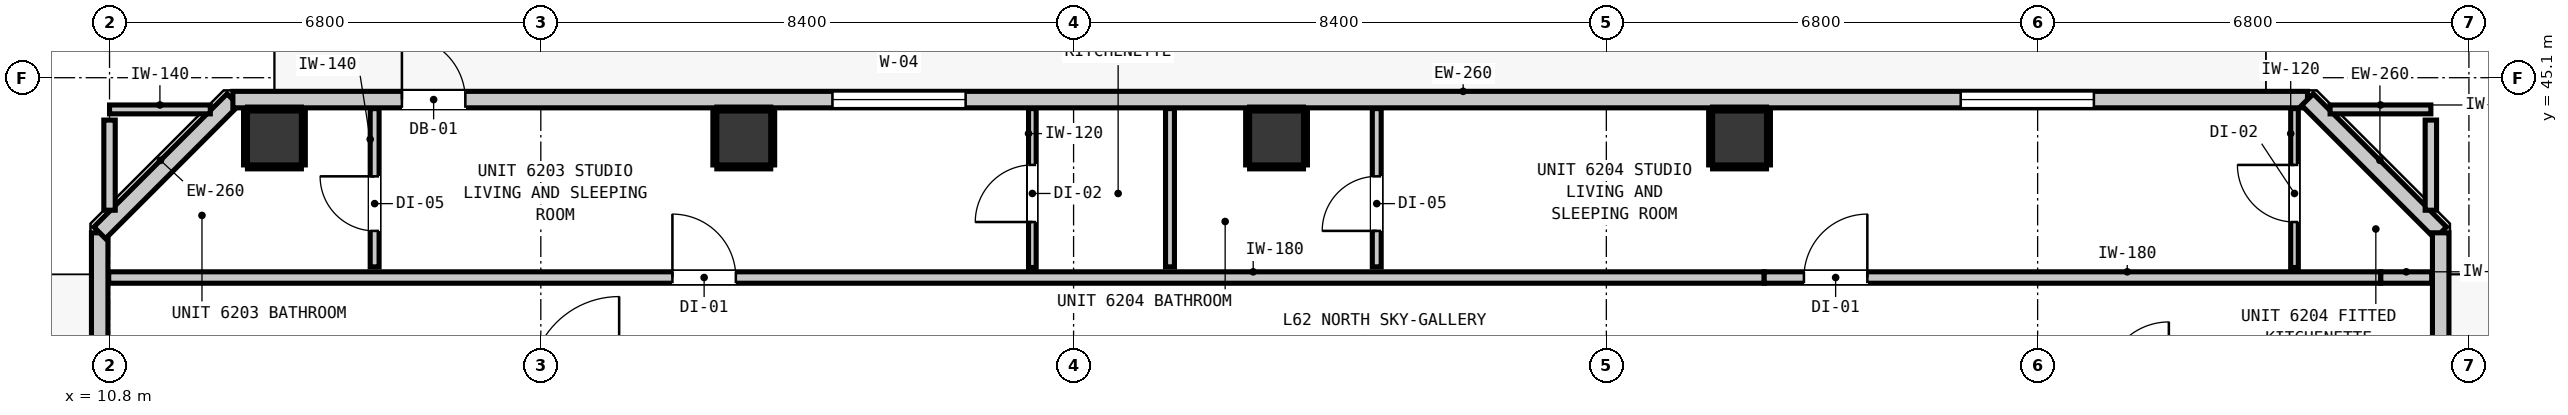
"""IFC4 building model, lengths in metres.
Left out: names, types, materials, properties, quantities, classifications, styles, units other than length and angle.
Written with IfcOpenShell. Run it as: python <this file> out.ifc"""

import sys

from ifc_helpers import new_model, si_unit, direction, frame, frame_2d, origin, origin_2d, place, context, subcontext, project, spatial, rectangle, extrude, element, fill, save


model = new_model("IFC4")
c1 = context("Model", 3, precision=1e-05, world=origin(), true_north=direction((0.0, 1.0)))
c2 = subcontext(c1, "Body", "Model", "MODEL_VIEW")
j1 = project(units=[si_unit("LENGTHUNIT", "METRE"), si_unit("PLANEANGLEUNIT", "RADIAN")], contexts=[c1])
p1 = place(None, origin())
s1 = spatial("IfcSite", under=j1, at=p1, CompositionType="ELEMENT")
p2 = place(p1, origin())
s2 = spatial("IfcBuilding", under=s1, at=p2, CompositionType="ELEMENT")
p3 = place(p2, frame((0.0, 0.0, 213.4)))
s3 = spatial("IfcBuildingStorey", under=s2, at=p3, CompositionType="ELEMENT", Elevation=213.4)
for number, where, z_axis, x_axis in (
    (1, (13.4, 44.15, 0.0), (0.0, 0.0, 1.0), (1.0, 0.0, 0.0)),
    (2, (20.8, 44.15, 0.0), (0.0, 0.0, 1.0), (1.0, 0.0, 0.0)),
    (3, (29.2, 44.15, 0.0), (0.0, 0.0, 1.0), (1.0, 0.0, 0.0)),
    (4, (36.5, 44.15, 0.0), (0.0, 0.0, 1.0), (1.0, 0.0, 0.0)),
):
    element("IfcColumn", number, at=place(p3, frame(where, z_axis=z_axis, x_axis=x_axis)), inside=s3, PredefinedType="COLUMN", context=c2, shape_type="SweptSolid", body=[
        extrude(rectangle(XDim=0.85, YDim=0.85, at=origin_2d()), origin(), (0.0, 0.0, 1.0), 3.32),
    ])
p4 = place(p3, frame((10.645, 12.345, 0.0), z_axis=(0.0, 0.0, 1.0), x_axis=(0.0, 1.0, 0.0)))
e5 = element("IfcWall", 5, at=p4, inside=s3, PredefinedType="STANDARD", context=c2, shape_type="SweptSolid", body=[
    extrude(rectangle(XDim=30.31, YDim=0.26, at=frame_2d((15.155, 0.0))), origin(), (0.0, 0.0, 1.0), 3.1),
])
p5 = place(p4, frame((0.91, 0.0, 0.0)))
e6 = element("IfcOpeningElement", 6, at=p5, cuts=e5, PredefinedType="OPENING", context=c2, shape_type="SweptSolid", body=[
    extrude(rectangle(XDim=1.0, YDim=2.15, at=frame_2d((0.5, 1.075))), frame((0.0, 0.14, 0.0), z_axis=(0.0, -1.0, 0.0), x_axis=(1.0, 0.0, 0.0)), (0.0, 0.0, 1.0), 0.28),
])
p6 = place(p4, frame((2.322, 0.0, 0.85)))
e7 = element("IfcOpeningElement", 7, at=p6, cuts=e5, PredefinedType="OPENING", context=c2, shape_type="SweptSolid", body=[
    extrude(rectangle(XDim=0.58, YDim=1.5, at=frame_2d((0.29, 0.75))), frame((0.0, 0.14, 0.0), z_axis=(0.0, -1.0, 0.0), x_axis=(1.0, 0.0, 0.0)), (0.0, 0.0, 1.0), 0.28),
])
p7 = place(p3, frame((10.645, 42.655, 0.0), z_axis=(0.0, 0.0, 1.0), x_axis=(0.707147883682, 0.707065676302, 0.0)))
e8 = element("IfcWall", 8, at=p7, inside=s3, PredefinedType="STANDARD", context=c2, shape_type="SweptSolid", body=[
    extrude(rectangle(XDim=2.97, YDim=0.26, at=frame_2d((1.485, 0.0))), origin(), (0.0, 0.0, 1.0), 3.1),
])
p8 = place(p3, frame((12.745, 44.755, 0.0), z_axis=(0.0, 0.0, 1.0), x_axis=(1.0, 0.0, 0.0)))
e9 = element("IfcWall", 9, at=p8, inside=s3, PredefinedType="STANDARD", context=c2, shape_type="SweptSolid", body=[
    extrude(rectangle(XDim=32.71, YDim=0.26, at=frame_2d((16.355, 0.0))), origin(), (0.0, 0.0, 1.0), 3.1),
])
p9 = place(p8, frame((2.665, 0.0, 0.0)))
e10 = element("IfcOpeningElement", 10, at=p9, cuts=e9, PredefinedType="OPENING", context=c2, shape_type="SweptSolid", body=[
    extrude(rectangle(XDim=1.0, YDim=2.15, at=frame_2d((0.5, 1.075))), frame((0.0, 0.14, 0.0), z_axis=(0.0, -1.0, 0.0), x_axis=(1.0, 0.0, 0.0)), (0.0, 0.0, 1.0), 0.28),
])
p10 = place(p8, frame((9.453, 0.0, 0.85)))
e11 = element("IfcOpeningElement", 11, at=p10, cuts=e9, PredefinedType="OPENING", context=c2, shape_type="SweptSolid", body=[
    extrude(rectangle(XDim=2.1, YDim=1.9, at=frame_2d((1.05, 0.95))), frame((0.0, 0.14, 0.0), z_axis=(0.0, -1.0, 0.0), x_axis=(1.0, 0.0, 0.0)), (0.0, 0.0, 1.0), 0.28),
])
p11 = place(p8, frame((27.242, 0.0, 0.85)))
e12 = element("IfcOpeningElement", 12, at=p11, cuts=e9, PredefinedType="OPENING", context=c2, shape_type="SweptSolid", body=[
    extrude(rectangle(XDim=2.1, YDim=1.9, at=frame_2d((1.05, 0.95))), frame((0.0, 0.14, 0.0), z_axis=(0.0, -1.0, 0.0), x_axis=(1.0, 0.0, 0.0)), (0.0, 0.0, 1.0), 0.28),
])
p12 = place(p3, frame((45.455, 44.755, 0.0), z_axis=(0.0, 0.0, 1.0), x_axis=(0.707106781187, -0.707106781187, 0.0)))
e13 = element("IfcWall", 13, at=p12, inside=s3, PredefinedType="STANDARD", context=c2, shape_type="SweptSolid", body=[
    extrude(rectangle(XDim=2.97, YDim=0.26, at=frame_2d((1.485, 0.0))), origin(), (0.0, 0.0, 1.0), 3.1),
])
p13 = place(p3, frame((47.555, 42.655, 0.0), z_axis=(0.0, 0.0, 1.0), x_axis=(0.0, -1.0, 0.0)))
e14 = element("IfcWall", 14, at=p13, inside=s3, PredefinedType="STANDARD", context=c2, shape_type="SweptSolid", body=[
    extrude(rectangle(XDim=30.31, YDim=0.26, at=frame_2d((15.155, 0.0))), origin(), (0.0, 0.0, 1.0), 3.1),
])
p14 = place(p13, frame((4.082, 0.0, 0.0)))
e15 = element("IfcOpeningElement", 15, at=p14, cuts=e14, PredefinedType="OPENING", context=c2, shape_type="SweptSolid", body=[
    extrude(rectangle(XDim=1.0, YDim=2.15, at=frame_2d((0.5, 1.075))), frame((0.0, 0.14, 0.0), z_axis=(0.0, -1.0, 0.0), x_axis=(1.0, 0.0, 0.0)), (0.0, 0.0, 1.0), 0.28),
])
p15 = place(p13, frame((24.101, 0.0, 0.85)))
e16 = element("IfcOpeningElement", 16, at=p15, cuts=e14, PredefinedType="OPENING", context=c2, shape_type="SweptSolid", body=[
    extrude(rectangle(XDim=2.1, YDim=1.9, at=frame_2d((1.05, 0.95))), frame((0.0, 0.14, 0.0), z_axis=(0.0, -1.0, 0.0), x_axis=(1.0, 0.0, 0.0)), (0.0, 0.0, 1.0), 0.28),
])
p16 = place(p13, frame((27.658, 0.0, 0.85)))
e17 = element("IfcOpeningElement", 17, at=p16, cuts=e14, PredefinedType="OPENING", context=c2, shape_type="SweptSolid", body=[
    extrude(rectangle(XDim=2.1, YDim=1.9, at=frame_2d((1.05, 0.95))), frame((0.0, 0.14, 0.0), z_axis=(0.0, -1.0, 0.0), x_axis=(1.0, 0.0, 0.0)), (0.0, 0.0, 1.0), 0.28),
])
p17 = place(p13, frame((15.255, 0.0, 0.85)))
e18 = element("IfcOpeningElement", 18, at=p17, cuts=e14, PredefinedType="OPENING", context=c2, shape_type="SweptSolid", body=[
    extrude(rectangle(XDim=2.1, YDim=1.9, at=frame_2d((1.05, 0.95))), frame((0.0, 0.14, 0.0), z_axis=(0.0, -1.0, 0.0), x_axis=(1.0, 0.0, 0.0)), (0.0, 0.0, 1.0), 0.28),
])
p18 = place(p3, frame((10.787, 41.95, 0.0), z_axis=(0.0, 0.0, 1.0), x_axis=(1.0, 0.0, 0.0)))
e19 = element("IfcWall", 19, at=p18, inside=s3, PredefinedType="PARTITIONING", context=c2, shape_type="SweptSolid", body=[
    extrude(rectangle(XDim=26.102, YDim=0.18, at=frame_2d((13.051, 0.0))), origin(), (0.0, 0.0, 1.0), 3.1),
])
p19 = place(p18, frame((8.888, 0.0, 0.0)))
e20 = element("IfcOpeningElement", 20, at=p19, cuts=e19, PredefinedType="OPENING", context=c2, shape_type="SweptSolid", body=[
    extrude(rectangle(XDim=1.0, YDim=2.15, at=frame_2d((0.5, 1.075))), frame((0.0, 0.1, 0.0), z_axis=(0.0, -1.0, 0.0), x_axis=(1.0, 0.0, 0.0)), (0.0, 0.0, 1.0), 0.2),
])
p20 = place(p3, frame((36.889, 41.95, 0.0), z_axis=(0.0, 0.0, 1.0), x_axis=(1.0, 0.0, 0.0)))
e21 = element("IfcWall", 21, at=p20, inside=s3, PredefinedType="PARTITIONING", context=c2, shape_type="SweptSolid", body=[
    extrude(rectangle(XDim=9.722, YDim=0.18, at=frame_2d((4.861, 0.0))), origin(), (0.0, 0.0, 1.0), 2.477),
])
p21 = place(p20, frame((0.626, 0.0, 0.0)))
e22 = element("IfcOpeningElement", 22, at=p21, cuts=e21, PredefinedType="OPENING", context=c2, shape_type="SweptSolid", body=[
    extrude(rectangle(XDim=1.0, YDim=2.15, at=frame_2d((0.5, 1.075))), frame((0.0, 0.1, 0.0), z_axis=(0.0, -1.0, 0.0), x_axis=(1.0, 0.0, 0.0)), (0.0, 0.0, 1.0), 0.2),
])
p22 = place(p3, frame((46.611, 41.95, 0.0), z_axis=(0.0, 0.0, 1.0), x_axis=(1.0, 0.0, 0.0)))
e23 = element("IfcWall", 23, at=p22, inside=s3, PredefinedType="PARTITIONING", context=c2, shape_type="SweptSolid", body=[
    extrude(rectangle(XDim=0.802, YDim=0.18, at=frame_2d((0.401, 0.0))), origin(), (0.0, 0.0, 1.0), 3.1),
])
for number, where, z_axis, x_axis in (
    (24, (10.8, 44.6, 0.0), (0.0, 0.0, 1.0), (1.0, 0.0, 0.0)),
    (25, (45.811, 44.6, 0.0), (0.0, 0.0, 1.0), (1.0, 0.0, 0.0)),
):
    element("IfcWall", number, at=place(p3, frame(where, z_axis=z_axis, x_axis=x_axis)), inside=s3, PredefinedType="PARTITIONING", context=c2, shape_type="SweptSolid", body=[
        extrude(rectangle(XDim=1.589, YDim=0.14, at=frame_2d((0.794, 0.0))), origin(), (0.0, 0.0, 1.0), 3.1),
    ])
for number, where, z_axis, x_axis in (
    (26, (10.8, 43.011, 0.0), (0.0, 0.0, 1.0), (0.0, 1.0, 0.0)),
    (27, (47.4, 43.011, 0.0), (0.0, 0.0, 1.0), (0.0, 1.0, 0.0)),
):
    element("IfcWall", number, at=place(p3, frame(where, z_axis=z_axis, x_axis=x_axis)), inside=s3, PredefinedType="PARTITIONING", context=c2, shape_type="SweptSolid", body=[
        extrude(rectangle(XDim=1.421, YDim=0.18, at=frame_2d((0.71, 0.0))), origin(), (0.0, 0.0, 1.0), 3.1),
    ])
p23 = place(p3, frame((14.98, 42.118, 0.0), z_axis=(0.0, 0.0, 1.0), x_axis=(0.0, 1.0, 0.0)))
e28 = element("IfcWall", 28, at=p23, inside=s3, PredefinedType="PARTITIONING", context=c2, shape_type="SweptSolid", body=[
    extrude(rectangle(XDim=2.495, YDim=0.14, at=frame_2d((1.248, 0.0))), origin(), (0.0, 0.0, 1.0), 3.1),
])
p24 = place(p23, frame((0.567, 0.0, 0.0)))
e29 = element("IfcOpeningElement", 29, at=p24, cuts=e28, PredefinedType="OPENING", context=c2, shape_type="SweptSolid", body=[
    extrude(rectangle(XDim=0.86, YDim=2.02, at=frame_2d((0.43, 1.01))), frame((0.0, 0.08, 0.0), z_axis=(0.0, -1.0, 0.0), x_axis=(1.0, 0.0, 0.0)), (0.0, 0.0, 1.0), 0.16),
])
p25 = place(p3, frame((27.52, 42.118, 0.0), z_axis=(0.0, 0.0, 1.0), x_axis=(0.0, 1.0, 0.0)))
e30 = element("IfcWall", 30, at=p25, inside=s3, PredefinedType="PARTITIONING", context=c2, shape_type="SweptSolid", body=[
    extrude(rectangle(XDim=2.495, YDim=0.14, at=frame_2d((1.248, 0.0))), origin(), (0.0, 0.0, 1.0), 3.1),
])
p26 = place(p3, frame((30.78, 42.118, 0.0), z_axis=(0.0, 0.0, 1.0), x_axis=(0.0, 1.0, 0.0)))
e31 = element("IfcWall", 31, at=p26, inside=s3, PredefinedType="PARTITIONING", context=c2, shape_type="SweptSolid", body=[
    extrude(rectangle(XDim=2.495, YDim=0.14, at=frame_2d((1.248, 0.0))), origin(), (0.0, 0.0, 1.0), 3.1),
])
p27 = place(p26, frame((0.567, 0.0, 0.0)))
e32 = element("IfcOpeningElement", 32, at=p27, cuts=e31, PredefinedType="OPENING", context=c2, shape_type="SweptSolid", body=[
    extrude(rectangle(XDim=0.86, YDim=2.02, at=frame_2d((0.43, 1.01))), frame((0.0, 0.08, 0.0), z_axis=(0.0, -1.0, 0.0), x_axis=(1.0, 0.0, 0.0)), (0.0, 0.0, 1.0), 0.16),
])
p28 = place(p3, frame((25.35, 42.108, 0.0), z_axis=(0.0, 0.0, 1.0), x_axis=(0.0, 1.0, 0.0)))
e33 = element("IfcWall", 33, at=p28, inside=s3, PredefinedType="PARTITIONING", context=c2, shape_type="SweptSolid", body=[
    extrude(rectangle(XDim=2.505, YDim=0.12, at=frame_2d((1.252, 0.0))), origin(), (0.0, 0.0, 1.0), 3.1),
])
p29 = place(p28, frame((0.717, 0.0, 0.0)))
e34 = element("IfcOpeningElement", 34, at=p29, cuts=e33, PredefinedType="OPENING", context=c2, shape_type="SweptSolid", body=[
    extrude(rectangle(XDim=0.9, YDim=2.1, at=frame_2d((0.45, 1.05))), frame((0.0, 0.07, 0.0), z_axis=(0.0, -1.0, 0.0), x_axis=(1.0, 0.0, 0.0)), (0.0, 0.0, 1.0), 0.14),
])
p30 = place(p3, frame((45.25, 42.108, 0.0), z_axis=(0.0, 0.0, 1.0), x_axis=(0.0, 1.0, 0.0)))
e35 = element("IfcWall", 35, at=p30, inside=s3, PredefinedType="PARTITIONING", context=c2, shape_type="SweptSolid", body=[
    extrude(rectangle(XDim=2.505, YDim=0.12, at=frame_2d((1.252, 0.0))), origin(), (0.0, 0.0, 1.0), 3.1),
])
p31 = place(p30, frame((0.717, 0.0, 0.0)))
e36 = element("IfcOpeningElement", 36, at=p31, cuts=e35, PredefinedType="OPENING", context=c2, shape_type="SweptSolid", body=[
    extrude(rectangle(XDim=0.9, YDim=2.1, at=frame_2d((0.45, 1.05))), frame((0.0, 0.07, 0.0), z_axis=(0.0, -1.0, 0.0), x_axis=(1.0, 0.0, 0.0)), (0.0, 0.0, 1.0), 0.14),
])
for number, where, z_axis, x_axis in (
    (37, (12.975, 43.693, 0.0), (0.0, 0.0, 1.0), (1.0, 0.0, 0.0)),
    (38, (12.975, 44.607, 0.0), (0.0, 0.0, 1.0), (1.0, 0.0, 0.0)),
    (39, (12.943, 43.725, 0.0), (0.0, 0.0, 1.0), (0.0, 1.0, 0.0)),
    (40, (13.857, 43.725, 0.0), (0.0, 0.0, 1.0), (0.0, 1.0, 0.0)),
):
    element("IfcWall", number, at=place(p3, frame(where, z_axis=z_axis, x_axis=x_axis)), inside=s3, PredefinedType="PARTITIONING", context=c2, shape_type="SweptSolid", body=[
        extrude(rectangle(XDim=0.85, YDim=0.06, at=frame_2d((0.425, 0.0))), origin(), (0.0, 0.0, 1.0), 1.45),
    ])
for number, where, z_axis, x_axis in (
    (41, (20.375, 43.693, 0.0), (0.0, 0.0, 1.0), (1.0, 0.0, 0.0)),
    (42, (20.375, 44.607, 0.0), (0.0, 0.0, 1.0), (1.0, 0.0, 0.0)),
):
    element("IfcWall", number, at=place(p3, frame(where, z_axis=z_axis, x_axis=x_axis)), inside=s3, PredefinedType="PARTITIONING", context=c2, shape_type="SweptSolid", body=[
        extrude(rectangle(XDim=0.85, YDim=0.06, at=frame_2d((0.425, 0.0))), origin(), (0.0, 0.0, 1.0), 1.45),
    ])
for number, where, z_axis, x_axis in (
    (43, (20.343, 43.725, 0.0), (0.0, 0.0, 1.0), (0.0, 1.0, 0.0)),
    (44, (21.257, 43.725, 0.0), (0.0, 0.0, 1.0), (0.0, 1.0, 0.0)),
):
    element("IfcWall", number, at=place(p3, frame(where, z_axis=z_axis, x_axis=x_axis)), inside=s3, PredefinedType="PARTITIONING", context=c2, shape_type="SweptSolid", body=[
        extrude(rectangle(XDim=0.85, YDim=0.06, at=frame_2d((0.425, 0.0))), origin(), (0.0, 0.0, 1.0), 1.45),
    ])
for number, where, z_axis, x_axis in (
    (45, (28.775, 43.693, 0.0), (0.0, 0.0, 1.0), (1.0, 0.0, 0.0)),
    (46, (28.775, 44.607, 0.0), (0.0, 0.0, 1.0), (1.0, 0.0, 0.0)),
):
    element("IfcWall", number, at=place(p3, frame(where, z_axis=z_axis, x_axis=x_axis)), inside=s3, PredefinedType="PARTITIONING", context=c2, shape_type="SweptSolid", body=[
        extrude(rectangle(XDim=0.85, YDim=0.06, at=frame_2d((0.425, 0.0))), origin(), (0.0, 0.0, 1.0), 1.45),
    ])
for number, where, z_axis, x_axis in (
    (47, (28.743, 43.725, 0.0), (0.0, 0.0, 1.0), (0.0, 1.0, 0.0)),
    (48, (29.657, 43.725, 0.0), (0.0, 0.0, 1.0), (0.0, 1.0, 0.0)),
):
    element("IfcWall", number, at=place(p3, frame(where, z_axis=z_axis, x_axis=x_axis)), inside=s3, PredefinedType="PARTITIONING", context=c2, shape_type="SweptSolid", body=[
        extrude(rectangle(XDim=0.85, YDim=0.06, at=frame_2d((0.425, 0.0))), origin(), (0.0, 0.0, 1.0), 1.45),
    ])
for number, where, z_axis, x_axis in (
    (49, (36.075, 43.693, 0.0), (0.0, 0.0, 1.0), (1.0, 0.0, 0.0)),
    (50, (36.075, 44.607, 0.0), (0.0, 0.0, 1.0), (1.0, 0.0, 0.0)),
):
    element("IfcWall", number, at=place(p3, frame(where, z_axis=z_axis, x_axis=x_axis)), inside=s3, PredefinedType="PARTITIONING", context=c2, shape_type="SweptSolid", body=[
        extrude(rectangle(XDim=0.85, YDim=0.06, at=frame_2d((0.425, 0.0))), origin(), (0.0, 0.0, 1.0), 1.45),
    ])
for number, where, z_axis, x_axis in (
    (51, (36.043, 43.725, 0.0), (0.0, 0.0, 1.0), (0.0, 1.0, 0.0)),
    (52, (36.957, 43.725, 0.0), (0.0, 0.0, 1.0), (0.0, 1.0, 0.0)),
):
    element("IfcWall", number, at=place(p3, frame(where, z_axis=z_axis, x_axis=x_axis)), inside=s3, PredefinedType="PARTITIONING", context=c2, shape_type="SweptSolid", body=[
        extrude(rectangle(XDim=0.85, YDim=0.06, at=frame_2d((0.425, 0.0))), origin(), (0.0, 0.0, 1.0), 1.45),
    ])
p32 = place(p9, origin())
e53 = element("IfcDoor", 53, at=p32, inside=s3, OperationType="SINGLE_SWING_LEFT", PredefinedType="DOOR", context=c2, shape_type="SweptSolid", body=[
    extrude(rectangle(XDim=1.0, YDim=2.15, at=frame_2d((0.5, 1.075))), frame((0.0, 0.025, 0.0), z_axis=(0.0, -1.0, 0.0), x_axis=(1.0, 0.0, 0.0)), (0.0, 0.0, 1.0), 0.05),
])
fill(e10, e53)
p33 = place(p10, origin())
e54 = element("IfcWindow", 54, at=p33, inside=s3, PartitioningType="SINGLE_PANEL", PredefinedType="WINDOW", context=c2, shape_type="SweptSolid", body=[
    extrude(rectangle(XDim=2.1, YDim=1.9, at=frame_2d((1.05, 0.95))), frame((0.0, 0.03, 0.0), z_axis=(0.0, -1.0, 0.0), x_axis=(1.0, 0.0, 0.0)), (0.0, 0.0, 1.0), 0.06),
])
fill(e11, e54)
p34 = place(p11, origin())
e55 = element("IfcWindow", 55, at=p34, inside=s3, PartitioningType="SINGLE_PANEL", PredefinedType="WINDOW", context=c2, shape_type="SweptSolid", body=[
    extrude(rectangle(XDim=2.1, YDim=1.9, at=frame_2d((1.05, 0.95))), frame((0.0, 0.03, 0.0), z_axis=(0.0, -1.0, 0.0), x_axis=(1.0, 0.0, 0.0)), (0.0, 0.0, 1.0), 0.06),
])
fill(e12, e55)
p35 = place(p19, origin())
e56 = element("IfcDoor", 56, at=p35, inside=s3, OperationType="SINGLE_SWING_LEFT", PredefinedType="DOOR", context=c2, shape_type="SweptSolid", body=[
    extrude(rectangle(XDim=1.0, YDim=2.15, at=frame_2d((0.5, 1.075))), frame((0.0, 0.025, 0.0), z_axis=(0.0, -1.0, 0.0), x_axis=(1.0, 0.0, 0.0)), (0.0, 0.0, 1.0), 0.05),
])
fill(e20, e56)
p36 = place(p24, origin())
e57 = element("IfcDoor", 57, at=p36, inside=s3, OperationType="SINGLE_SWING_RIGHT", PredefinedType="DOOR", context=c2, shape_type="SweptSolid", body=[
    extrude(rectangle(XDim=0.86, YDim=2.02, at=frame_2d((0.43, 1.01))), frame((0.0, 0.025, 0.0), z_axis=(0.0, -1.0, 0.0), x_axis=(1.0, 0.0, 0.0)), (0.0, 0.0, 1.0), 0.05),
])
fill(e29, e57)
p37 = place(p29, origin())
e58 = element("IfcDoor", 58, at=p37, inside=s3, OperationType="SINGLE_SWING_LEFT", PredefinedType="DOOR", context=c2, shape_type="SweptSolid", body=[
    extrude(rectangle(XDim=0.9, YDim=2.1, at=frame_2d((0.45, 1.05))), frame((0.0, 0.025, 0.0), z_axis=(0.0, -1.0, 0.0), x_axis=(1.0, 0.0, 0.0)), (0.0, 0.0, 1.0), 0.05),
])
fill(e34, e58)
p38 = place(p21, origin())
e59 = element("IfcDoor", 59, at=p38, inside=s3, OperationType="SINGLE_SWING_RIGHT", PredefinedType="DOOR", context=c2, shape_type="SweptSolid", body=[
    extrude(rectangle(XDim=1.0, YDim=2.15, at=frame_2d((0.5, 1.075))), frame((0.0, 0.025, 0.0), z_axis=(0.0, -1.0, 0.0), x_axis=(1.0, 0.0, 0.0)), (0.0, 0.0, 1.0), 0.05),
])
fill(e22, e59)
p39 = place(p27, origin())
e60 = element("IfcDoor", 60, at=p39, inside=s3, OperationType="SINGLE_SWING_LEFT", PredefinedType="DOOR", context=c2, shape_type="SweptSolid", body=[
    extrude(rectangle(XDim=0.86, YDim=2.02, at=frame_2d((0.43, 1.01))), frame((0.0, 0.025, 0.0), z_axis=(0.0, -1.0, 0.0), x_axis=(1.0, 0.0, 0.0)), (0.0, 0.0, 1.0), 0.05),
])
fill(e32, e60)
p40 = place(p31, origin())
e61 = element("IfcDoor", 61, at=p40, inside=s3, OperationType="SINGLE_SWING_RIGHT", PredefinedType="DOOR", context=c2, shape_type="SweptSolid", body=[
    extrude(rectangle(XDim=0.9, YDim=2.1, at=frame_2d((0.45, 1.05))), frame((0.0, 0.025, 0.0), z_axis=(0.0, -1.0, 0.0), x_axis=(1.0, 0.0, 0.0)), (0.0, 0.0, 1.0), 0.05),
])
fill(e36, e61)
save(model, sys.argv[1])
